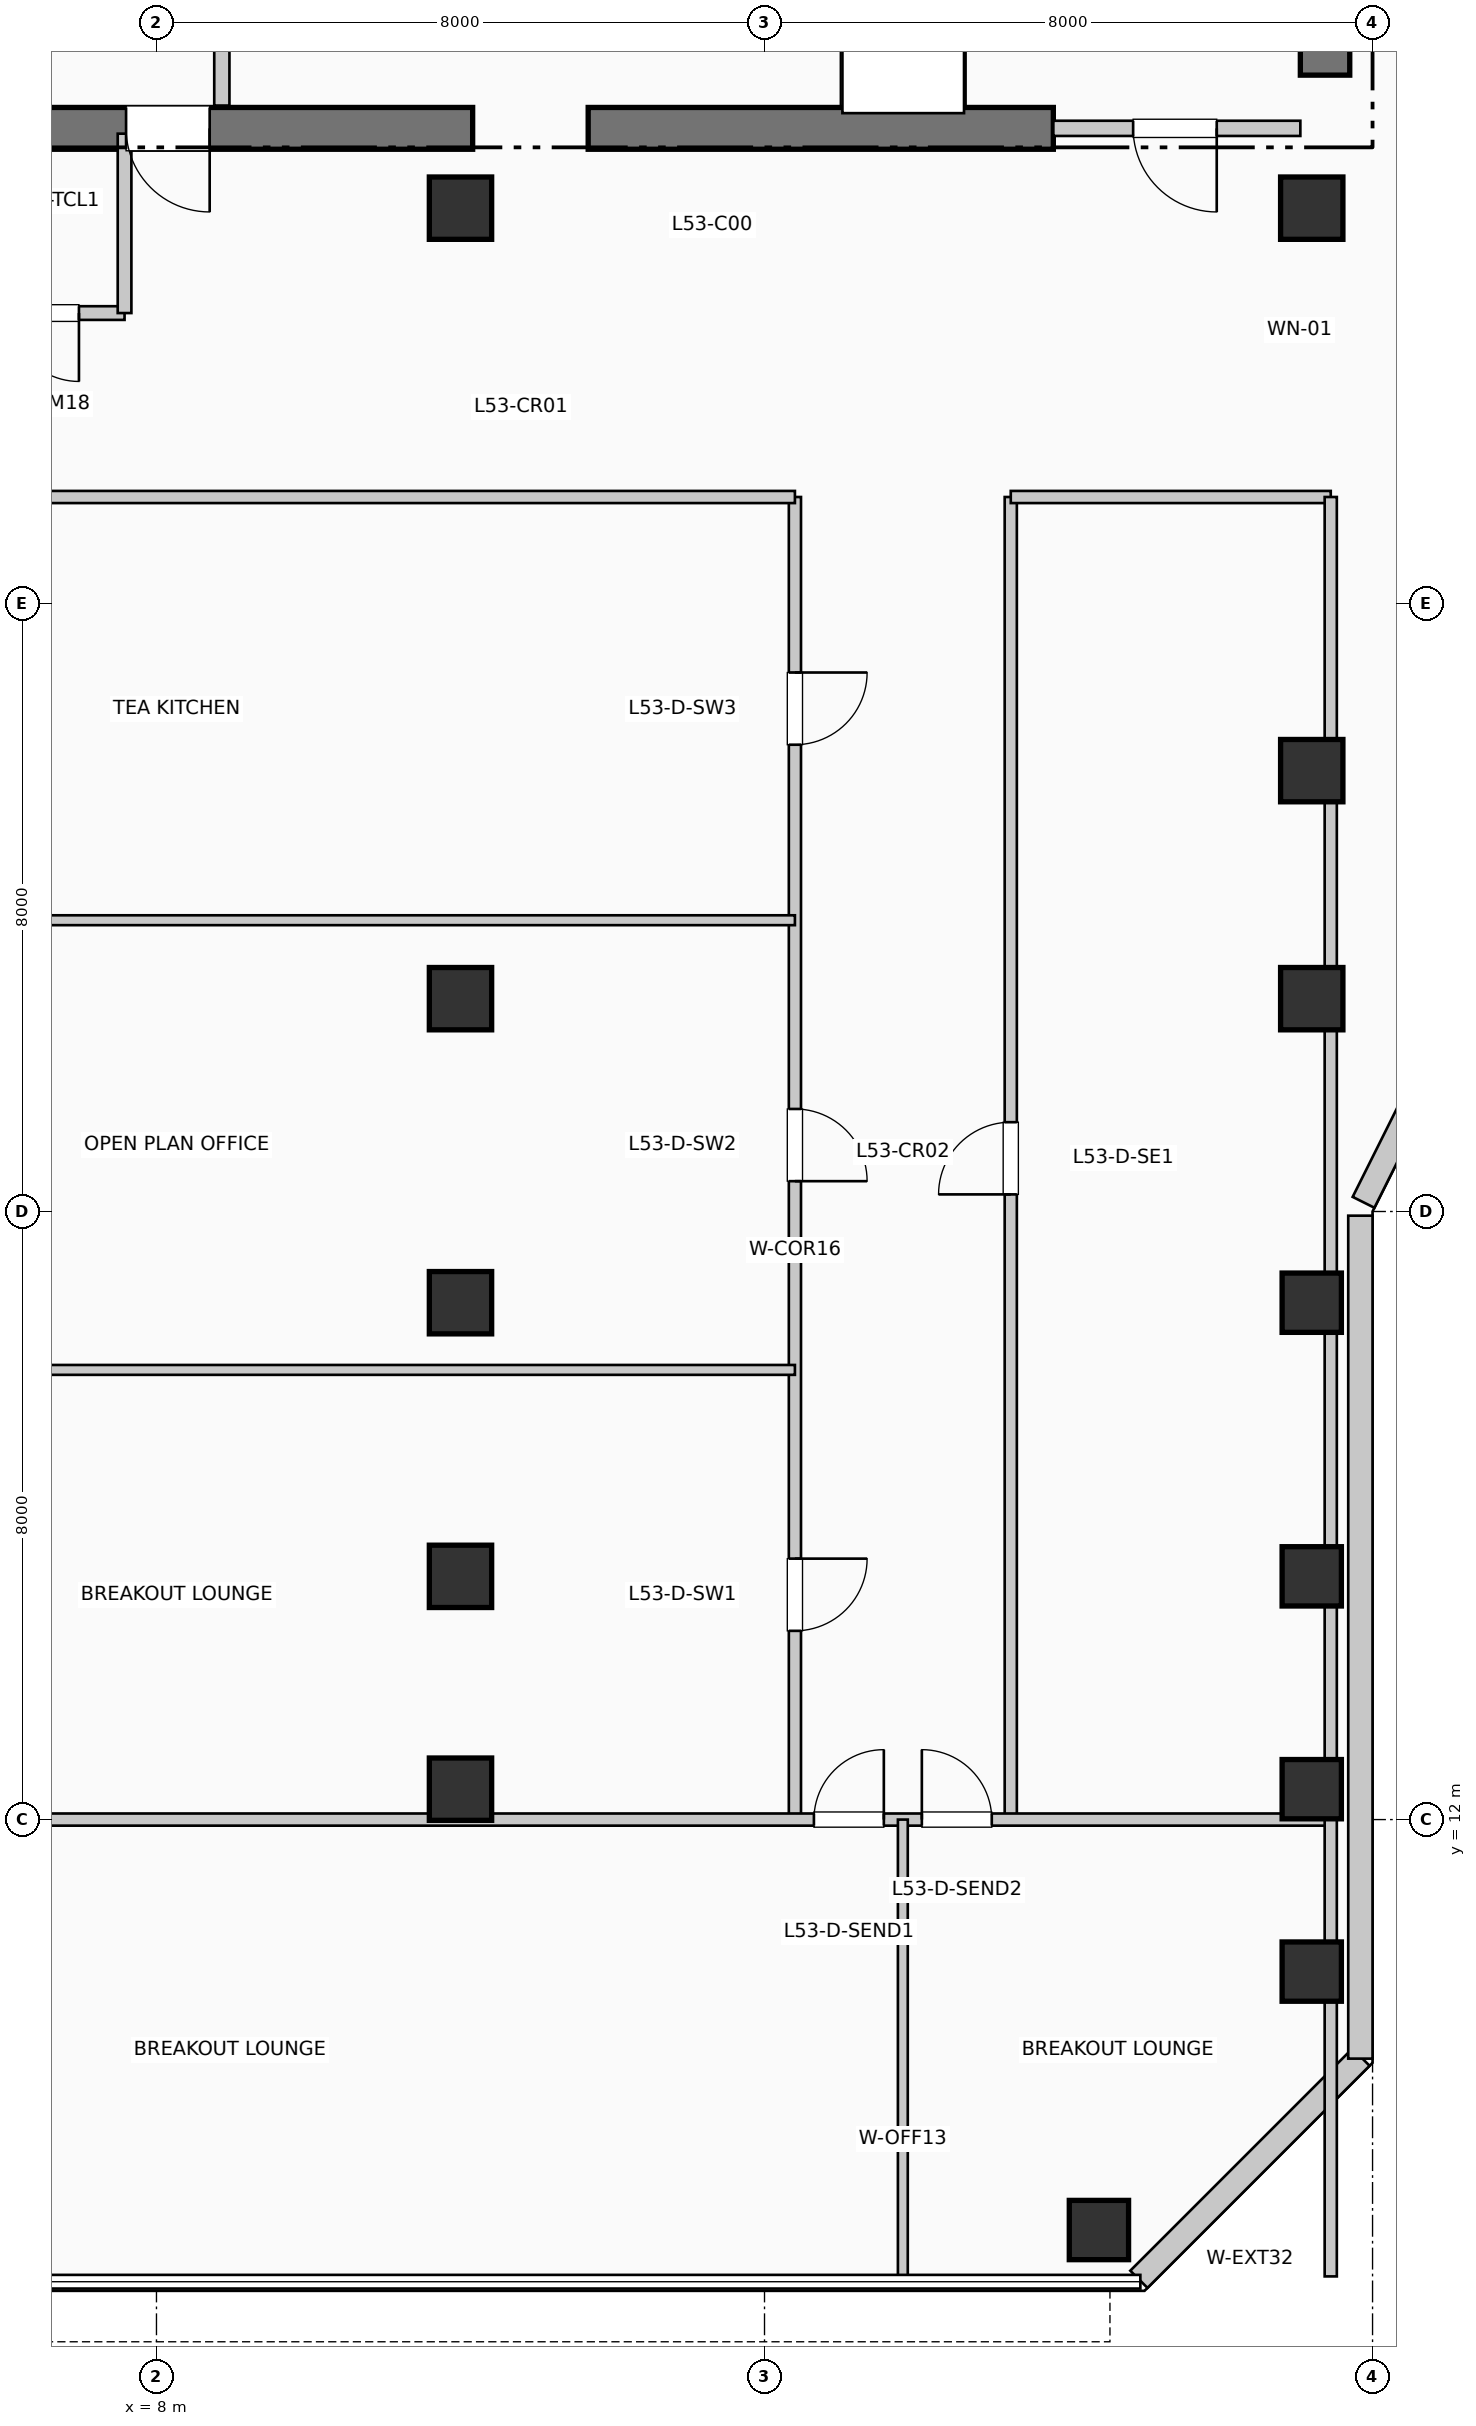
"""IFC4 building model, lengths in metres.
Left out: names, types, materials, properties, quantities, classifications, styles, units other than length and angle.
Written with IfcOpenShell. Run it as: python <this file> out.ifc"""

import sys

from ifc_helpers import new_model, si_unit, direction, frame, frame_2d, origin, origin_2d, place, context, subcontext, project, spatial, rectangle, extrude, element, fill, save


model = new_model("IFC4")
c1 = context("Model", 3, precision=1e-05, world=origin(), true_north=direction((0.0, 1.0)))
c2 = subcontext(c1, "Body", "Model", "MODEL_VIEW")
j1 = project(units=[si_unit("LENGTHUNIT", "METRE"), si_unit("PLANEANGLEUNIT", "RADIAN")], contexts=[c1])
p1 = place(None, origin())
s1 = spatial("IfcSite", under=j1, at=p1, CompositionType="ELEMENT")
p2 = place(p1, origin())
s2 = spatial("IfcBuilding", under=s1, at=p2, CompositionType="ELEMENT")
p3 = place(p2, frame((0.0, 0.0, 219.78)))
s3 = spatial("IfcBuildingStorey", under=s2, at=p3, CompositionType="ELEMENT", Elevation=219.78)
p4 = place(p3, frame((23.375, 34.95, 0.0), z_axis=(0.0, 0.0, 1.0), x_axis=(0.0, 1.0, 0.0)))
e1 = element("IfcWall", 1, at=p4, inside=s3, PredefinedType="SHEAR", context=c2, shape_type="SweptSolid", body=[
    extrude(rectangle(XDim=10.64, YDim=0.65, at=frame_2d((5.32, 0.0))), origin(), (0.0, 0.0, 1.0), 3.96),
])
p5 = place(p3, frame((1.45, 34.25, 0.0), z_axis=(0.0, 0.0, 1.0), x_axis=(1.0, 0.0, 0.0)))
e2 = element("IfcWall", 2, at=p5, inside=s3, PredefinedType="SHEAR", context=c2, shape_type="SweptSolid", body=[
    extrude(rectangle(XDim=10.71, YDim=0.55, at=frame_2d((5.355, 0.0))), origin(), (0.0, 0.0, 1.0), 3.96),
])
p6 = place(p5, frame((7.25, 0.0, 0.0), z_axis=(0.0, 0.0, 1.0), x_axis=(-1.0, 0.0, 0.0)))
e3 = element("IfcOpeningElement", 3, at=p6, cuts=e2, PredefinedType="OPENING", context=c2, shape_type="SweptSolid", body=[
    extrude(rectangle(XDim=1.1, YDim=2.15, at=frame_2d((0.55, 1.075))), frame((0.0, 0.285, 0.0), z_axis=(0.0, -1.0, 0.0), x_axis=(1.0, 0.0, 0.0)), (0.0, 0.0, 1.0), 0.57),
])
p7 = place(p3, frame((13.68, 34.25, 0.0), z_axis=(0.0, 0.0, 1.0), x_axis=(1.0, 0.0, 0.0)))
e4 = element("IfcWall", 4, at=p7, inside=s3, PredefinedType="SHEAR", context=c2, shape_type="SweptSolid", body=[
    extrude(rectangle(XDim=6.12, YDim=0.55, at=frame_2d((3.06, 0.0))), origin(), (0.0, 0.0, 1.0), 3.96),
])
for number, where, z_axis, x_axis in (
    (5, (12.0, 12.4, 0.0), (0.0, 0.0, 1.0), (1.0, 0.0, 0.0)),
    (6, (12.0, 15.2, 0.0), (0.0, 0.0, 1.0), (1.0, 0.0, 0.0)),
    (7, (12.0, 18.8, 0.0), (0.0, 0.0, 1.0), (1.0, 0.0, 0.0)),
    (8, (12.0, 22.8, 0.0), (0.0, 0.0, 1.0), (1.0, 0.0, 0.0)),
    (9, (12.0, 33.2, 0.0), (0.0, 0.0, 1.0), (1.0, 0.0, 0.0)),
):
    element("IfcColumn", number, at=place(p3, frame(where, z_axis=z_axis, x_axis=x_axis)), inside=s3, PredefinedType="COLUMN", context=c2, shape_type="SweptSolid", body=[
        extrude(rectangle(XDim=0.82, YDim=0.82, at=origin_2d()), origin(), (0.0, 0.0, 1.0), 3.96),
    ])
for number, where, z_axis, x_axis in (
    (10, (20.4, 6.6, 0.0), (0.0, 0.0, 1.0), (1.0, 0.0, 0.0)),
    (11, (23.2, 10.0, 0.0), (0.0, 0.0, 1.0), (1.0, 0.0, 0.0)),
    (12, (23.2, 12.4, 0.0), (0.0, 0.0, 1.0), (1.0, 0.0, 0.0)),
    (13, (23.2, 15.2, 0.0), (0.0, 0.0, 1.0), (1.0, 0.0, 0.0)),
    (14, (23.2, 18.8, 0.0), (0.0, 0.0, 1.0), (1.0, 0.0, 0.0)),
):
    element("IfcColumn", number, at=place(p3, frame(where, z_axis=z_axis, x_axis=x_axis)), inside=s3, PredefinedType="COLUMN", context=c2, shape_type="SweptSolid", body=[
        extrude(rectangle(XDim=0.78, YDim=0.78, at=origin_2d()), origin(), (0.0, 0.0, 1.0), 3.96),
    ])
for number, where, z_axis, x_axis in (
    (15, (23.2, 22.8, 0.0), (0.0, 0.0, 1.0), (1.0, 0.0, 0.0)),
    (16, (23.2, 25.8, 0.0), (0.0, 0.0, 1.0), (1.0, 0.0, 0.0)),
    (17, (23.2, 33.2, 0.0), (0.0, 0.0, 1.0), (1.0, 0.0, 0.0)),
):
    element("IfcColumn", number, at=place(p3, frame(where, z_axis=z_axis, x_axis=x_axis)), inside=s3, PredefinedType="COLUMN", context=c2, shape_type="SweptSolid", body=[
        extrude(rectangle(XDim=0.82, YDim=0.82, at=origin_2d()), origin(), (0.0, 0.0, 1.0), 3.96),
    ])
p8 = place(p3, frame((20.926, 5.952, 0.0), z_axis=(0.0, 0.0, 1.0), x_axis=(0.707077242712, 0.707136318428, 0.0)))
e18 = element("IfcWall", 18, at=p8, inside=s3, PredefinedType="SOLIDWALL", context=c2, shape_type="SweptSolid", body=[
    extrude(rectangle(XDim=4.133, YDim=0.32, at=frame_2d((2.066, 0.0))), origin(), (0.0, 0.0, 1.0), 3.71),
])
p9 = place(p3, frame((23.84, 8.855, 0.0), z_axis=(0.0, 0.0, 1.0), x_axis=(0.0, 1.0, 0.0)))
e19 = element("IfcWall", 19, at=p9, inside=s3, PredefinedType="SOLIDWALL", context=c2, shape_type="SweptSolid", body=[
    extrude(rectangle(XDim=11.09, YDim=0.32, at=frame_2d((5.545, 0.0))), origin(), (0.0, 0.0, 1.0), 3.71),
])
p10 = place(p3, frame((23.882, 20.121, 0.0), z_axis=(0.0, 0.0, 1.0), x_axis=(0.447121734542, 0.894473115583, 0.0)))
e20 = element("IfcWall", 20, at=p10, inside=s3, PredefinedType="SOLIDWALL", context=c2, shape_type="SweptSolid", body=[
    extrude(rectangle(XDim=2.126, YDim=0.32, at=frame_2d((1.063, 0.0))), origin(), (0.0, 0.0, 1.0), 3.71),
])
p11 = place(p3, frame((8.86, 34.55, 0.0), z_axis=(0.0, 0.0, 1.0), x_axis=(0.0, 1.0, 0.0)))
e21 = element("IfcWall", 21, at=p11, inside=s3, PredefinedType="PARTITIONING", context=c2, shape_type="SweptSolid", body=[
    extrude(rectangle(XDim=2.5, YDim=0.2, at=frame_2d((1.25, 0.0))), origin(), (0.0, 0.0, 1.0), 3.71),
])
p12 = place(p3, frame((19.8, 34.25, 0.0), z_axis=(0.0, 0.0, 1.0), x_axis=(1.0, 0.0, 0.0)))
e22 = element("IfcWall", 22, at=p12, inside=s3, PredefinedType="PARTITIONING", context=c2, shape_type="SweptSolid", body=[
    extrude(rectangle(XDim=3.25, YDim=0.2, at=frame_2d((1.625, 0.0))), origin(), (0.0, 0.0, 1.0), 3.71),
])
p13 = place(p12, frame((2.15, 0.0, 0.0), z_axis=(0.0, 0.0, 1.0), x_axis=(-1.0, 0.0, 0.0)))
e23 = element("IfcOpeningElement", 23, at=p13, cuts=e22, PredefinedType="OPENING", context=c2, shape_type="SweptSolid", body=[
    extrude(rectangle(XDim=1.1, YDim=2.15, at=frame_2d((0.55, 1.075))), frame((0.0, 0.11, 0.0), z_axis=(0.0, -1.0, 0.0), x_axis=(1.0, 0.0, 0.0)), (0.0, 0.0, 1.0), 0.22),
])
p14 = place(p3, frame((5.5, 31.82, 0.0), z_axis=(0.0, 0.0, 1.0), x_axis=(1.0, 0.0, 0.0)))
e24 = element("IfcWall", 24, at=p14, inside=s3, PredefinedType="PLUMBINGWALL", context=c2, shape_type="SweptSolid", body=[
    extrude(rectangle(XDim=2.08, YDim=0.18, at=frame_2d((1.04, 0.0))), origin(), (0.0, 0.0, 1.0), 3.71),
])
p15 = place(p14, frame((1.48, 0.0, 0.0), z_axis=(0.0, 0.0, 1.0), x_axis=(-1.0, 0.0, 0.0)))
e25 = element("IfcOpeningElement", 25, at=p15, cuts=e24, PredefinedType="OPENING", context=c2, shape_type="SweptSolid", body=[
    extrude(rectangle(XDim=0.9, YDim=2.1, at=frame_2d((0.45, 1.05))), frame((0.0, 0.1, 0.0), z_axis=(0.0, -1.0, 0.0), x_axis=(1.0, 0.0, 0.0)), (0.0, 0.0, 1.0), 0.2),
])
p16 = place(p3, frame((7.58, 31.82, 0.0), z_axis=(0.0, 0.0, 1.0), x_axis=(0.0, 1.0, 0.0)))
e26 = element("IfcWall", 26, at=p16, inside=s3, PredefinedType="PLUMBINGWALL", context=c2, shape_type="SweptSolid", body=[
    extrude(rectangle(XDim=2.36, YDim=0.18, at=frame_2d((1.18, 0.0))), origin(), (0.0, 0.0, 1.0), 3.71),
])
p17 = place(p3, frame((16.4, 12.0, 0.0), z_axis=(0.0, 0.0, 1.0), x_axis=(0.0, 1.0, 0.0)))
e27 = element("IfcWall", 27, at=p17, inside=s3, PredefinedType="PARTITIONING", context=c2, shape_type="SweptSolid", body=[
    extrude(rectangle(XDim=17.4, YDim=0.16, at=frame_2d((8.7, 0.0))), origin(), (0.0, 0.0, 1.0), 3.71),
])
p18 = place(p17, frame((3.433, 0.0, 0.0), z_axis=(0.0, 0.0, 1.0), x_axis=(-1.0, 0.0, 0.0)))
e28 = element("IfcOpeningElement", 28, at=p18, cuts=e27, PredefinedType="OPENING", context=c2, shape_type="SweptSolid", body=[
    extrude(rectangle(XDim=0.95, YDim=2.15, at=frame_2d((0.475, 1.075))), frame((0.0, 0.09, 0.0), z_axis=(0.0, -1.0, 0.0), x_axis=(1.0, 0.0, 0.0)), (0.0, 0.0, 1.0), 0.18),
])
p19 = place(p17, frame((9.349, 0.0, 0.0), z_axis=(0.0, 0.0, 1.0), x_axis=(-1.0, 0.0, 0.0)))
e29 = element("IfcOpeningElement", 29, at=p19, cuts=e27, PredefinedType="OPENING", context=c2, shape_type="SweptSolid", body=[
    extrude(rectangle(XDim=0.95, YDim=2.15, at=frame_2d((0.475, 1.075))), frame((0.0, 0.09, 0.0), z_axis=(0.0, -1.0, 0.0), x_axis=(1.0, 0.0, 0.0)), (0.0, 0.0, 1.0), 0.18),
])
p20 = place(p17, frame((15.091, 0.0, 0.0), z_axis=(0.0, 0.0, 1.0), x_axis=(-1.0, 0.0, 0.0)))
e30 = element("IfcOpeningElement", 30, at=p20, cuts=e27, PredefinedType="OPENING", context=c2, shape_type="SweptSolid", body=[
    extrude(rectangle(XDim=0.95, YDim=2.15, at=frame_2d((0.475, 1.075))), frame((0.0, 0.09, 0.0), z_axis=(0.0, -1.0, 0.0), x_axis=(1.0, 0.0, 0.0)), (0.0, 0.0, 1.0), 0.18),
])
p21 = place(p3, frame((19.24, 12.0, 0.0), z_axis=(0.0, 0.0, 1.0), x_axis=(0.0, 1.0, 0.0)))
e31 = element("IfcWall", 31, at=p21, inside=s3, PredefinedType="PARTITIONING", context=c2, shape_type="SweptSolid", body=[
    extrude(rectangle(XDim=17.4, YDim=0.16, at=frame_2d((8.7, 0.0))), origin(), (0.0, 0.0, 1.0), 3.71),
])
p22 = place(p21, frame((8.225, 0.0, 0.0)))
e32 = element("IfcOpeningElement", 32, at=p22, cuts=e31, PredefinedType="OPENING", context=c2, shape_type="SweptSolid", body=[
    extrude(rectangle(XDim=0.95, YDim=2.15, at=frame_2d((0.475, 1.075))), frame((0.0, 0.09, 0.0), z_axis=(0.0, -1.0, 0.0), x_axis=(1.0, 0.0, 0.0)), (0.0, 0.0, 1.0), 0.18),
])
p23 = place(p3, frame((0.19, 12.0, 0.0), z_axis=(0.0, 0.0, 1.0), x_axis=(1.0, 0.0, 0.0)))
e33 = element("IfcWall", 33, at=p23, inside=s3, PredefinedType="PARTITIONING", context=c2, shape_type="SweptSolid", body=[
    extrude(rectangle(XDim=23.26, YDim=0.16, at=frame_2d((11.63, 0.0))), origin(), (0.0, 0.0, 1.0), 3.095),
])
p24 = place(p23, frame((16.46, 0.0, 0.0)))
e34 = element("IfcOpeningElement", 34, at=p24, cuts=e33, PredefinedType="OPENING", context=c2, shape_type="SweptSolid", body=[
    extrude(rectangle(XDim=0.92, YDim=2.1, at=frame_2d((0.46, 1.05))), frame((0.0, 0.09, 0.0), z_axis=(0.0, -1.0, 0.0), x_axis=(1.0, 0.0, 0.0)), (0.0, 0.0, 1.0), 0.18),
])
p25 = place(p23, frame((17.88, 0.0, 0.0)))
e35 = element("IfcOpeningElement", 35, at=p25, cuts=e33, PredefinedType="OPENING", context=c2, shape_type="SweptSolid", body=[
    extrude(rectangle(XDim=0.92, YDim=2.1, at=frame_2d((0.46, 1.05))), frame((0.0, 0.09, 0.0), z_axis=(0.0, -1.0, 0.0), x_axis=(1.0, 0.0, 0.0)), (0.0, 0.0, 1.0), 0.18),
])
p26 = place(p3, frame((0.19, 29.4, 0.0), z_axis=(0.0, 0.0, 1.0), x_axis=(1.0, 0.0, 0.0)))
e36 = element("IfcWall", 36, at=p26, inside=s3, PredefinedType="PARTITIONING", context=c2, shape_type="SweptSolid", body=[
    extrude(rectangle(XDim=16.21, YDim=0.16, at=frame_2d((8.105, 0.0))), origin(), (0.0, 0.0, 1.0), 3.365),
])
p27 = place(p3, frame((19.24, 29.4, 0.0), z_axis=(0.0, 0.0, 1.0), x_axis=(1.0, 0.0, 0.0)))
e37 = element("IfcWall", 37, at=p27, inside=s3, PredefinedType="PARTITIONING", context=c2, shape_type="SweptSolid", body=[
    extrude(rectangle(XDim=4.21, YDim=0.16, at=frame_2d((2.105, 0.0))), origin(), (0.0, 0.0, 1.0), 3.365),
])
p28 = place(p3, frame((23.45, 5.99, 0.0), z_axis=(0.0, 0.0, 1.0), x_axis=(0.0, 1.0, 0.0)))
e38 = element("IfcWall", 38, at=p28, inside=s3, PredefinedType="PARTITIONING", context=c2, shape_type="SweptSolid", body=[
    extrude(rectangle(XDim=23.41, YDim=0.16, at=frame_2d((11.705, 0.0))), origin(), (0.0, 0.0, 1.0), 3.095),
])
p29 = place(p3, frame((17.82, 5.99, 0.0), z_axis=(0.0, 0.0, 1.0), x_axis=(0.0, 1.0, 0.0)))
e39 = element("IfcWall", 39, at=p29, inside=s3, PredefinedType="PARTITIONING", context=c2, shape_type="SweptSolid", body=[
    extrude(rectangle(XDim=6.01, YDim=0.13, at=frame_2d((3.005, 0.0))), origin(), (0.0, 0.0, 1.0), 3.71),
])
for number, where, z_axis, x_axis in (
    (40, (0.19, 17.916, 0.0), (0.0, 0.0, 1.0), (1.0, 0.0, 0.0)),
    (41, (0.19, 23.832, 0.0), (0.0, 0.0, 1.0), (1.0, 0.0, 0.0)),
):
    element("IfcWall", number, at=place(p3, frame(where, z_axis=z_axis, x_axis=x_axis)), inside=s3, PredefinedType="PARTITIONING", context=c2, shape_type="SweptSolid", body=[
        extrude(rectangle(XDim=16.21, YDim=0.13, at=frame_2d((8.105, 0.0))), origin(), (0.0, 0.0, 1.0), 3.71),
    ])
p30 = place(p6, origin())
e42 = element("IfcDoor", 42, at=p30, inside=s3, OperationType="SINGLE_SWING_RIGHT", PredefinedType="DOOR", context=c2, shape_type="SweptSolid", body=[
    extrude(rectangle(XDim=1.1, YDim=2.15, at=frame_2d((0.55, 1.075))), frame((0.0, 0.025, 0.0), z_axis=(0.0, -1.0, 0.0), x_axis=(1.0, 0.0, 0.0)), (0.0, 0.0, 1.0), 0.05),
])
fill(e3, e42)
p31 = place(p13, origin())
e43 = element("IfcDoor", 43, at=p31, inside=s3, OperationType="SINGLE_SWING_RIGHT", PredefinedType="DOOR", context=c2, shape_type="SweptSolid", body=[
    extrude(rectangle(XDim=1.1, YDim=2.15, at=frame_2d((0.55, 1.075))), frame((0.0, 0.025, 0.0), z_axis=(0.0, -1.0, 0.0), x_axis=(1.0, 0.0, 0.0)), (0.0, 0.0, 1.0), 0.05),
])
fill(e23, e43)
p32 = place(p15, origin())
e44 = element("IfcDoor", 44, at=p32, inside=s3, OperationType="SINGLE_SWING_RIGHT", PredefinedType="DOOR", context=c2, shape_type="SweptSolid", body=[
    extrude(rectangle(XDim=0.9, YDim=2.1, at=frame_2d((0.45, 1.05))), frame((0.0, 0.025, 0.0), z_axis=(0.0, -1.0, 0.0), x_axis=(1.0, 0.0, 0.0)), (0.0, 0.0, 1.0), 0.05),
])
fill(e25, e44)
p33 = place(p24, origin())
e45 = element("IfcDoor", 45, at=p33, inside=s3, OperationType="SINGLE_SWING_RIGHT", PredefinedType="DOOR", context=c2, shape_type="SweptSolid", body=[
    extrude(rectangle(XDim=0.92, YDim=2.1, at=frame_2d((0.46, 1.05))), frame((0.0, 0.025, 0.0), z_axis=(0.0, -1.0, 0.0), x_axis=(1.0, 0.0, 0.0)), (0.0, 0.0, 1.0), 0.05),
])
fill(e34, e45)
p34 = place(p25, origin())
e46 = element("IfcDoor", 46, at=p34, inside=s3, OperationType="SINGLE_SWING_LEFT", PredefinedType="DOOR", context=c2, shape_type="SweptSolid", body=[
    extrude(rectangle(XDim=0.92, YDim=2.1, at=frame_2d((0.46, 1.05))), frame((0.0, 0.025, 0.0), z_axis=(0.0, -1.0, 0.0), x_axis=(1.0, 0.0, 0.0)), (0.0, 0.0, 1.0), 0.05),
])
fill(e35, e46)
p35 = place(p18, origin())
e47 = element("IfcDoor", 47, at=p35, inside=s3, OperationType="SINGLE_SWING_RIGHT", PredefinedType="DOOR", context=c2, shape_type="SweptSolid", body=[
    extrude(rectangle(XDim=0.95, YDim=2.15, at=frame_2d((0.475, 1.075))), frame((0.0, 0.025, 0.0), z_axis=(0.0, -1.0, 0.0), x_axis=(1.0, 0.0, 0.0)), (0.0, 0.0, 1.0), 0.05),
])
fill(e28, e47)
p36 = place(p19, origin())
e48 = element("IfcDoor", 48, at=p36, inside=s3, OperationType="SINGLE_SWING_LEFT", PredefinedType="DOOR", context=c2, shape_type="SweptSolid", body=[
    extrude(rectangle(XDim=0.95, YDim=2.15, at=frame_2d((0.475, 1.075))), frame((0.0, 0.025, 0.0), z_axis=(0.0, -1.0, 0.0), x_axis=(1.0, 0.0, 0.0)), (0.0, 0.0, 1.0), 0.05),
])
fill(e29, e48)
p37 = place(p20, origin())
e49 = element("IfcDoor", 49, at=p37, inside=s3, OperationType="SINGLE_SWING_RIGHT", PredefinedType="DOOR", context=c2, shape_type="SweptSolid", body=[
    extrude(rectangle(XDim=0.95, YDim=2.15, at=frame_2d((0.475, 1.075))), frame((0.0, 0.025, 0.0), z_axis=(0.0, -1.0, 0.0), x_axis=(1.0, 0.0, 0.0)), (0.0, 0.0, 1.0), 0.05),
])
fill(e30, e49)
p38 = place(p22, origin())
e50 = element("IfcDoor", 50, at=p38, inside=s3, OperationType="SINGLE_SWING_LEFT", PredefinedType="DOOR", context=c2, shape_type="SweptSolid", body=[
    extrude(rectangle(XDim=0.95, YDim=2.15, at=frame_2d((0.475, 1.075))), frame((0.0, 0.025, 0.0), z_axis=(0.0, -1.0, 0.0), x_axis=(1.0, 0.0, 0.0)), (0.0, 0.0, 1.0), 0.05),
])
fill(e32, e50)
save(model, sys.argv[1])
